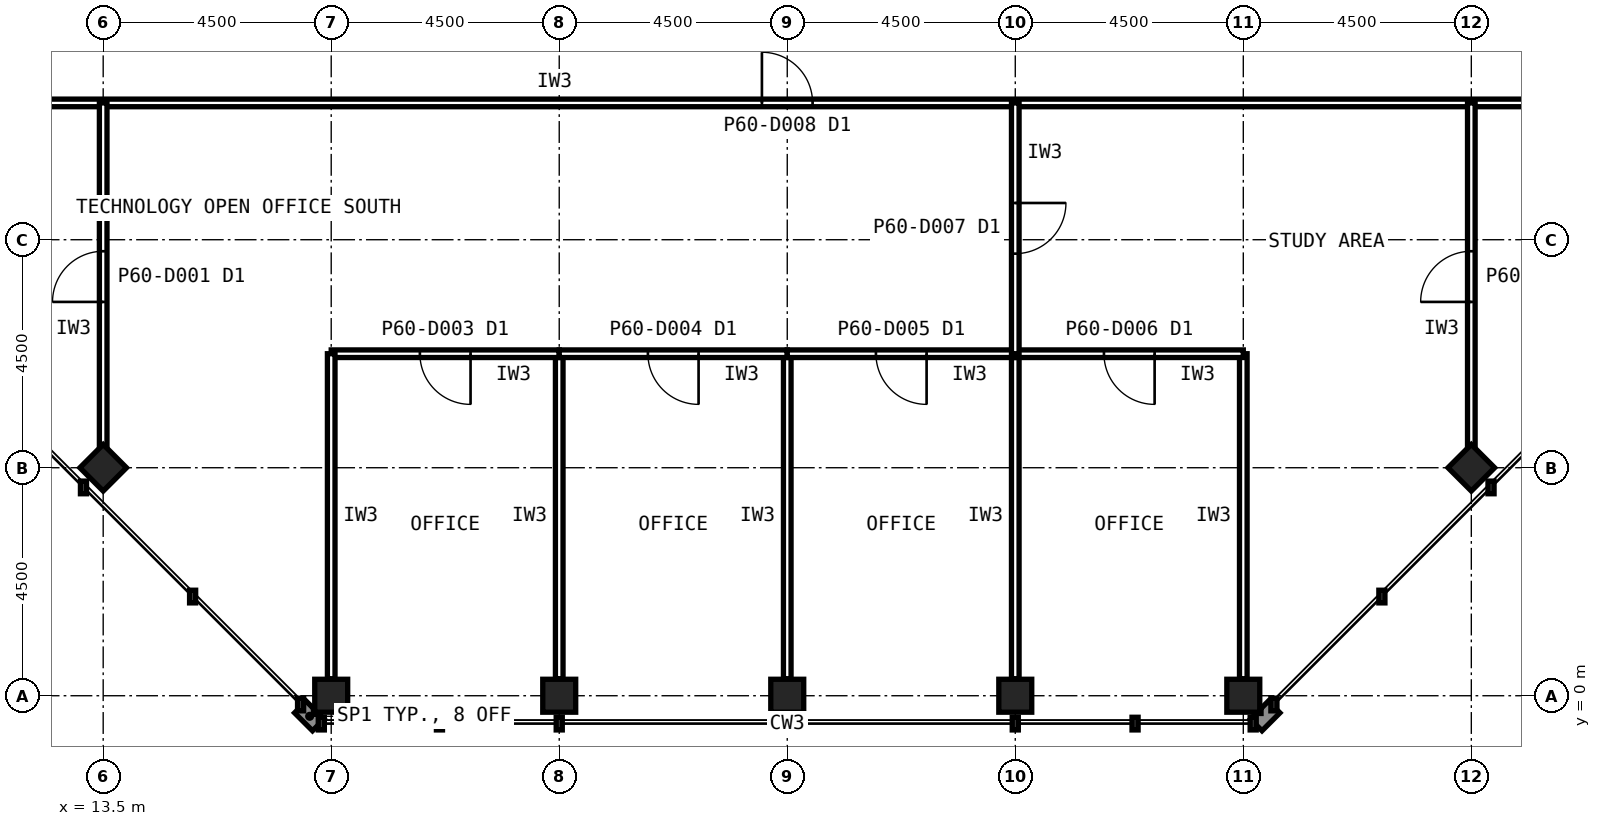
"""IFC4 building model, lengths in metres.
Left out: names, types, materials, properties, quantities, classifications, styles, units other than length and angle.
Written with IfcOpenShell. Run it as: python <this file> out.ifc"""

import sys

from ifc_helpers import new_model, si_unit, direction, frame, frame_2d, origin, origin_2d, place, context, subcontext, project, spatial, rectangle, hollow_rectangle, extrude, element, fill, save


model = new_model("IFC4")
c1 = context("Model", 3, precision=1e-05, world=origin(), true_north=direction((0.0, 1.0)))
c2 = subcontext(c1, "Body", "Model", "MODEL_VIEW")
j1 = project(units=[si_unit("LENGTHUNIT", "METRE"), si_unit("PLANEANGLEUNIT", "RADIAN")], contexts=[c1])
p1 = place(None, origin())
s1 = spatial("IfcSite", under=j1, at=p1, CompositionType="ELEMENT")
p2 = place(p1, origin())
s2 = spatial("IfcBuilding", under=s1, at=p2, CompositionType="ELEMENT")
p3 = place(p2, frame((0.0, 0.0, 254.6)))
s3 = spatial("IfcBuildingStorey", under=s2, at=p3, CompositionType="ELEMENT", Elevation=254.6)
for number, where, z_axis, x_axis in (
    (1, (18.0, 0.0, 0.0), (0.0, 0.0, 1.0), (1.0, 0.0, 0.0)),
    (2, (22.5, 0.0, 0.0), (0.0, 0.0, 1.0), (1.0, 0.0, 0.0)),
    (3, (27.0, 0.0, 0.0), (0.0, 0.0, 1.0), (1.0, 0.0, 0.0)),
    (4, (31.5, 0.0, 0.0), (0.0, 0.0, 1.0), (1.0, 0.0, 0.0)),
    (5, (36.0, 0.0, 0.0), (0.0, 0.0, 1.0), (1.0, 0.0, 0.0)),
    (6, (13.5, 4.5, 0.0), (0.0, 0.0, 1.0), (0.707, 0.707, 0.0)),
    (7, (40.5, 4.5, 0.0), (0.0, 0.0, 1.0), (0.707, 0.707, 0.0)),
):
    element("IfcColumn", number, at=place(p3, frame(where, z_axis=z_axis, x_axis=x_axis)), inside=s3, PredefinedType="COLUMN", context=c2, shape_type="SweptSolid", body=[
        extrude(hollow_rectangle(XDim=0.65, YDim=0.65, WallThickness=0.032, at=origin_2d()), origin(), (0.0, 0.0, 1.0), 4.0),
    ])
p4 = place(p3, frame((11.7, 11.7, 0.0), z_axis=(0.0, 0.0, 1.0), x_axis=(1.0, 0.0, 0.0)))
e8 = element("IfcWall", 8, at=p4, inside=s3, PredefinedType="PARTITIONING", context=c2, shape_type="SweptSolid", body=[
    extrude(rectangle(XDim=30.6, YDim=0.15, at=frame_2d((15.3, 0.0))), origin(), (0.0, 0.0, 1.0), 3.84),
])
p5 = place(p4, frame((14.8, 0.0, 0.0)))
e9 = element("IfcOpeningElement", 9, at=p5, cuts=e8, PredefinedType="OPENING", context=c2, shape_type="SweptSolid", body=[
    extrude(rectangle(XDim=1.0, YDim=2.1, at=frame_2d((0.5, 1.05))), frame((0.0, 0.085, 0.0), z_axis=(0.0, -1.0, 0.0), x_axis=(1.0, 0.0, 0.0)), (0.0, 0.0, 1.0), 0.17),
])
p6 = place(p3, frame((22.5, 0.335, 0.0), z_axis=(0.0, 0.0, 1.0), x_axis=(0.0, 1.0, 0.0)))
e10 = element("IfcWall", 10, at=p6, inside=s3, PredefinedType="PARTITIONING", context=c2, shape_type="SweptSolid", body=[
    extrude(rectangle(XDim=6.415, YDim=0.15, at=frame_2d((3.208, 0.0))), origin(), (0.0, 0.0, 1.0), 2.989),
])
p7 = place(p3, frame((22.5, 6.75, 0.0), z_axis=(0.0, 0.0, 1.0), x_axis=(-1.0, 0.0, 0.0)))
e11 = element("IfcWall", 11, at=p7, inside=s3, PredefinedType="PARTITIONING", context=c2, shape_type="SweptSolid", body=[
    extrude(rectangle(XDim=4.5, YDim=0.15, at=frame_2d((2.25, 0.0))), origin(), (0.0, 0.0, 1.0), 3.84),
])
p8 = place(p7, frame((1.75, 0.0, 0.0)))
e12 = element("IfcOpeningElement", 12, at=p8, cuts=e11, PredefinedType="OPENING", context=c2, shape_type="SweptSolid", body=[
    extrude(rectangle(XDim=1.0, YDim=2.1, at=frame_2d((0.5, 1.05))), frame((0.0, 0.085, 0.0), z_axis=(0.0, -1.0, 0.0), x_axis=(1.0, 0.0, 0.0)), (0.0, 0.0, 1.0), 0.17),
])
for number, where, z_axis, x_axis in (
    (13, (18.0, 6.75, 0.0), (0.0, 0.0, 1.0), (0.0, -1.0, 0.0)),
    (14, (27.0, 0.335, 0.0), (0.0, 0.0, 1.0), (0.0, 1.0, 0.0)),
):
    element("IfcWall", number, at=place(p3, frame(where, z_axis=z_axis, x_axis=x_axis)), inside=s3, PredefinedType="PARTITIONING", context=c2, shape_type="SweptSolid", body=[
        extrude(rectangle(XDim=6.415, YDim=0.15, at=frame_2d((3.208, 0.0))), origin(), (0.0, 0.0, 1.0), 2.989),
    ])
p9 = place(p3, frame((27.0, 6.75, 0.0), z_axis=(0.0, 0.0, 1.0), x_axis=(-1.0, 0.0, 0.0)))
e15 = element("IfcWall", 15, at=p9, inside=s3, PredefinedType="PARTITIONING", context=c2, shape_type="SweptSolid", body=[
    extrude(rectangle(XDim=4.5, YDim=0.15, at=frame_2d((2.25, 0.0))), origin(), (0.0, 0.0, 1.0), 3.84),
])
p10 = place(p9, frame((1.75, 0.0, 0.0)))
e16 = element("IfcOpeningElement", 16, at=p10, cuts=e15, PredefinedType="OPENING", context=c2, shape_type="SweptSolid", body=[
    extrude(rectangle(XDim=1.0, YDim=2.1, at=frame_2d((0.5, 1.05))), frame((0.0, 0.085, 0.0), z_axis=(0.0, -1.0, 0.0), x_axis=(1.0, 0.0, 0.0)), (0.0, 0.0, 1.0), 0.17),
])
p11 = place(p3, frame((31.5, 0.335, 0.0), z_axis=(0.0, 0.0, 1.0), x_axis=(0.0, 1.0, 0.0)))
e17 = element("IfcWall", 17, at=p11, inside=s3, PredefinedType="PARTITIONING", context=c2, shape_type="SweptSolid", body=[
    extrude(rectangle(XDim=6.415, YDim=0.15, at=frame_2d((3.208, 0.0))), origin(), (0.0, 0.0, 1.0), 2.989),
])
p12 = place(p3, frame((31.5, 6.75, 0.0), z_axis=(0.0, 0.0, 1.0), x_axis=(-1.0, 0.0, 0.0)))
e18 = element("IfcWall", 18, at=p12, inside=s3, PredefinedType="PARTITIONING", context=c2, shape_type="SweptSolid", body=[
    extrude(rectangle(XDim=4.5, YDim=0.15, at=frame_2d((2.25, 0.0))), origin(), (0.0, 0.0, 1.0), 3.84),
])
p13 = place(p12, frame((1.75, 0.0, 0.0)))
e19 = element("IfcOpeningElement", 19, at=p13, cuts=e18, PredefinedType="OPENING", context=c2, shape_type="SweptSolid", body=[
    extrude(rectangle(XDim=1.0, YDim=2.1, at=frame_2d((0.5, 1.05))), frame((0.0, 0.085, 0.0), z_axis=(0.0, -1.0, 0.0), x_axis=(1.0, 0.0, 0.0)), (0.0, 0.0, 1.0), 0.17),
])
p14 = place(p3, frame((36.0, 0.335, 0.0), z_axis=(0.0, 0.0, 1.0), x_axis=(0.0, 1.0, 0.0)))
e20 = element("IfcWall", 20, at=p14, inside=s3, PredefinedType="PARTITIONING", context=c2, shape_type="SweptSolid", body=[
    extrude(rectangle(XDim=6.415, YDim=0.15, at=frame_2d((3.208, 0.0))), origin(), (0.0, 0.0, 1.0), 2.989),
])
p15 = place(p3, frame((36.0, 6.75, 0.0), z_axis=(0.0, 0.0, 1.0), x_axis=(-1.0, 0.0, 0.0)))
e21 = element("IfcWall", 21, at=p15, inside=s3, PredefinedType="PARTITIONING", context=c2, shape_type="SweptSolid", body=[
    extrude(rectangle(XDim=4.5, YDim=0.15, at=frame_2d((2.25, 0.0))), origin(), (0.0, 0.0, 1.0), 3.84),
])
p16 = place(p15, frame((1.75, 0.0, 0.0)))
e22 = element("IfcOpeningElement", 22, at=p16, cuts=e21, PredefinedType="OPENING", context=c2, shape_type="SweptSolid", body=[
    extrude(rectangle(XDim=1.0, YDim=2.1, at=frame_2d((0.5, 1.05))), frame((0.0, 0.085, 0.0), z_axis=(0.0, -1.0, 0.0), x_axis=(1.0, 0.0, 0.0)), (0.0, 0.0, 1.0), 0.17),
])
p17 = place(p3, frame((40.5, 4.845, 0.0), z_axis=(0.0, 0.0, 1.0), x_axis=(0.0, 1.0, 0.0)))
e23 = element("IfcWall", 23, at=p17, inside=s3, PredefinedType="PARTITIONING", context=c2, shape_type="SweptSolid", body=[
    extrude(rectangle(XDim=6.855, YDim=0.15, at=frame_2d((3.427, 0.0))), origin(), (0.0, 0.0, 1.0), 2.989),
])
p18 = place(p17, frame((2.927, 0.0, 0.0)))
e24 = element("IfcOpeningElement", 24, at=p18, cuts=e23, PredefinedType="OPENING", context=c2, shape_type="SweptSolid", body=[
    extrude(rectangle(XDim=1.0, YDim=2.1, at=frame_2d((0.5, 1.05))), frame((0.0, 0.085, 0.0), z_axis=(0.0, -1.0, 0.0), x_axis=(1.0, 0.0, 0.0)), (0.0, 0.0, 1.0), 0.17),
])
p19 = place(p3, frame((13.5, 4.845, 0.0), z_axis=(0.0, 0.0, 1.0), x_axis=(0.0, 1.0, 0.0)))
e25 = element("IfcWall", 25, at=p19, inside=s3, PredefinedType="PARTITIONING", context=c2, shape_type="SweptSolid", body=[
    extrude(rectangle(XDim=6.855, YDim=0.15, at=frame_2d((3.427, 0.0))), origin(), (0.0, 0.0, 1.0), 2.989),
])
p20 = place(p19, frame((2.927, 0.0, 0.0)))
e26 = element("IfcOpeningElement", 26, at=p20, cuts=e25, PredefinedType="OPENING", context=c2, shape_type="SweptSolid", body=[
    extrude(rectangle(XDim=1.0, YDim=2.1, at=frame_2d((0.5, 1.05))), frame((0.0, 0.085, 0.0), z_axis=(0.0, -1.0, 0.0), x_axis=(1.0, 0.0, 0.0)), (0.0, 0.0, 1.0), 0.17),
])
p21 = place(p3, frame((31.5, 11.7, 0.0), z_axis=(0.0, 0.0, 1.0), x_axis=(0.0, -1.0, 0.0)))
e27 = element("IfcWall", 27, at=p21, inside=s3, PredefinedType="PARTITIONING", context=c2, shape_type="SweptSolid", body=[
    extrude(rectangle(XDim=4.95, YDim=0.15, at=frame_2d((2.475, 0.0))), origin(), (0.0, 0.0, 1.0), 2.989),
])
p22 = place(p21, frame((1.975, 0.0, 0.0)))
e28 = element("IfcOpeningElement", 28, at=p22, cuts=e27, PredefinedType="OPENING", context=c2, shape_type="SweptSolid", body=[
    extrude(rectangle(XDim=1.0, YDim=2.1, at=frame_2d((0.5, 1.05))), frame((0.0, 0.085, 0.0), z_axis=(0.0, -1.0, 0.0), x_axis=(1.0, 0.0, 0.0)), (0.0, 0.0, 1.0), 0.17),
])
p23 = place(p5, origin())
e29 = element("IfcDoor", 29, at=p23, inside=s3, OperationType="SINGLE_SWING_LEFT", PredefinedType="DOOR", context=c2, shape_type="SweptSolid", body=[
    extrude(rectangle(XDim=1.0, YDim=2.1, at=frame_2d((0.5, 1.05))), frame((0.0, 0.025, 0.0), z_axis=(0.0, -1.0, 0.0), x_axis=(1.0, 0.0, 0.0)), (0.0, 0.0, 1.0), 0.05),
])
fill(e9, e29)
p24 = place(p8, origin())
e30 = element("IfcDoor", 30, at=p24, inside=s3, OperationType="SINGLE_SWING_LEFT", PredefinedType="DOOR", context=c2, shape_type="SweptSolid", body=[
    extrude(rectangle(XDim=1.0, YDim=2.1, at=frame_2d((0.5, 1.05))), frame((0.0, 0.025, 0.0), z_axis=(0.0, -1.0, 0.0), x_axis=(1.0, 0.0, 0.0)), (0.0, 0.0, 1.0), 0.05),
])
fill(e12, e30)
p25 = place(p10, origin())
e31 = element("IfcDoor", 31, at=p25, inside=s3, OperationType="SINGLE_SWING_LEFT", PredefinedType="DOOR", context=c2, shape_type="SweptSolid", body=[
    extrude(rectangle(XDim=1.0, YDim=2.1, at=frame_2d((0.5, 1.05))), frame((0.0, 0.025, 0.0), z_axis=(0.0, -1.0, 0.0), x_axis=(1.0, 0.0, 0.0)), (0.0, 0.0, 1.0), 0.05),
])
fill(e16, e31)
p26 = place(p13, origin())
e32 = element("IfcDoor", 32, at=p26, inside=s3, OperationType="SINGLE_SWING_LEFT", PredefinedType="DOOR", context=c2, shape_type="SweptSolid", body=[
    extrude(rectangle(XDim=1.0, YDim=2.1, at=frame_2d((0.5, 1.05))), frame((0.0, 0.025, 0.0), z_axis=(0.0, -1.0, 0.0), x_axis=(1.0, 0.0, 0.0)), (0.0, 0.0, 1.0), 0.05),
])
fill(e19, e32)
p27 = place(p16, origin())
e33 = element("IfcDoor", 33, at=p27, inside=s3, OperationType="SINGLE_SWING_LEFT", PredefinedType="DOOR", context=c2, shape_type="SweptSolid", body=[
    extrude(rectangle(XDim=1.0, YDim=2.1, at=frame_2d((0.5, 1.05))), frame((0.0, 0.025, 0.0), z_axis=(0.0, -1.0, 0.0), x_axis=(1.0, 0.0, 0.0)), (0.0, 0.0, 1.0), 0.05),
])
fill(e22, e33)
p28 = place(p18, origin())
e34 = element("IfcDoor", 34, at=p28, inside=s3, OperationType="SINGLE_SWING_LEFT", PredefinedType="DOOR", context=c2, shape_type="SweptSolid", body=[
    extrude(rectangle(XDim=1.0, YDim=2.1, at=frame_2d((0.5, 1.05))), frame((0.0, 0.025, 0.0), z_axis=(0.0, -1.0, 0.0), x_axis=(1.0, 0.0, 0.0)), (0.0, 0.0, 1.0), 0.05),
])
fill(e24, e34)
p29 = place(p20, origin())
e35 = element("IfcDoor", 35, at=p29, inside=s3, OperationType="SINGLE_SWING_LEFT", PredefinedType="DOOR", context=c2, shape_type="SweptSolid", body=[
    extrude(rectangle(XDim=1.0, YDim=2.1, at=frame_2d((0.5, 1.05))), frame((0.0, 0.025, 0.0), z_axis=(0.0, -1.0, 0.0), x_axis=(1.0, 0.0, 0.0)), (0.0, 0.0, 1.0), 0.05),
])
fill(e26, e35)
p30 = place(p22, origin())
e36 = element("IfcDoor", 36, at=p30, inside=s3, OperationType="SINGLE_SWING_LEFT", PredefinedType="DOOR", context=c2, shape_type="SweptSolid", body=[
    extrude(rectangle(XDim=1.0, YDim=2.1, at=frame_2d((0.5, 1.05))), frame((0.0, 0.025, 0.0), z_axis=(0.0, -1.0, 0.0), x_axis=(1.0, 0.0, 0.0)), (0.0, 0.0, 1.0), 0.05),
])
fill(e28, e36)
save(model, sys.argv[1])
